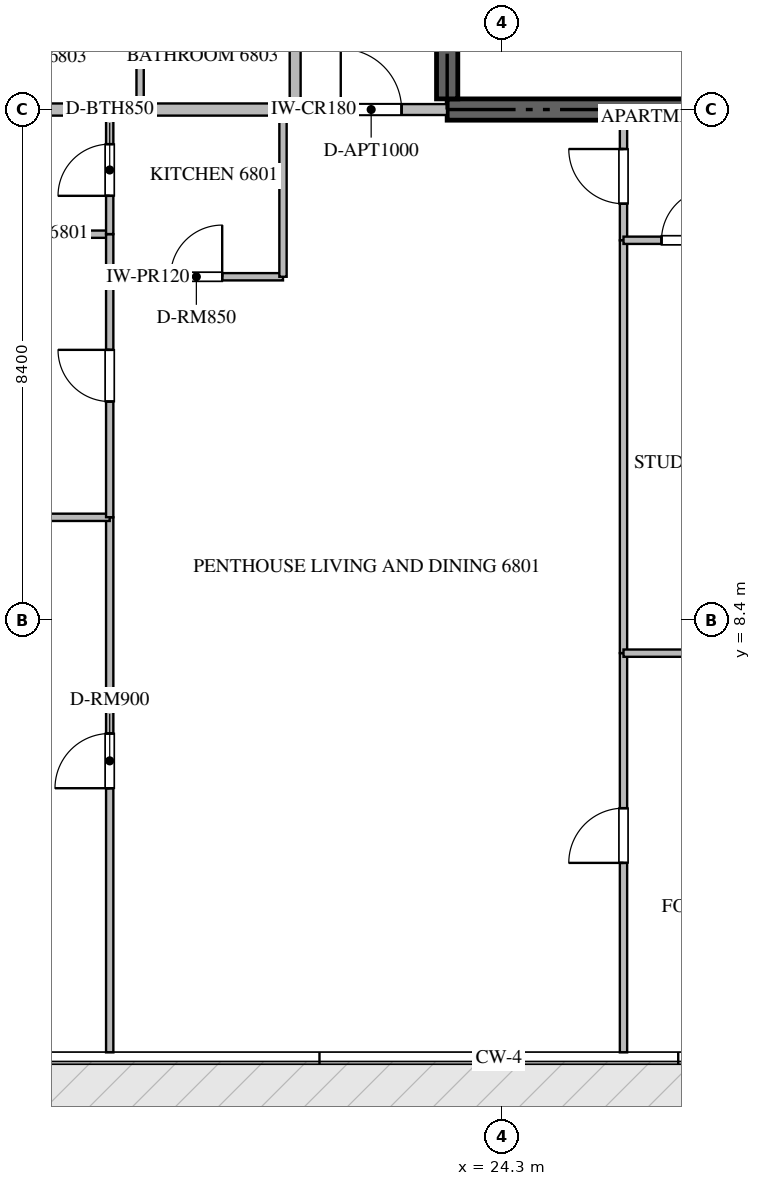
"""IFC4 building model, lengths in metres.
Left out: names, types, materials, properties, quantities, classifications, styles, units other than length and angle.
Written with IfcOpenShell. Run it as: python <this file> out.ifc"""

import sys

from ifc_helpers import new_model, si_unit, direction, frame, frame_2d, origin, place, context, subcontext, project, spatial, rectangle, extrude, source, transform, mapped, element, fill, save


model = new_model("IFC4")
c1 = context("Model", 3, precision=1e-05, world=origin(), true_north=direction((0.0, 1.0)))
c2 = subcontext(c1, "Body", "Model", "MODEL_VIEW")
j1 = project(units=[si_unit("LENGTHUNIT", "METRE"), si_unit("PLANEANGLEUNIT", "RADIAN")], contexts=[c1])
p1 = place(None, origin())
s1 = spatial("IfcSite", under=j1, at=p1, CompositionType="ELEMENT")
p2 = place(p1, origin())
s2 = spatial("IfcBuilding", under=s1, at=p2, CompositionType="ELEMENT")
p3 = place(p2, frame((0.0, 0.0, 272.05)))
s3 = spatial("IfcBuildingStorey", under=s2, at=p3, CompositionType="ELEMENT", Elevation=272.05)
p4 = place(p3, frame((23.4, 16.8, -0.26), z_axis=(0.0, 0.0, 1.0), x_axis=(1.0, 0.0, 0.0)))
e1 = element("IfcWall", 1, at=p4, inside=s3, PredefinedType="SHEAR", context=c2, shape_type="SweptSolid", body=[
    extrude(rectangle(XDim=18.0, YDim=0.35, at=frame_2d((9.0, 0.0))), origin(), (0.0, 0.0, 1.0), 3.848),
])
p5 = place(p3, frame((23.4, 16.975, -0.26), z_axis=(0.0, 0.0, 1.0), x_axis=(0.0, 1.0, 0.0)))
e2 = element("IfcWall", 2, at=p5, inside=s3, PredefinedType="SHEAR", context=c2, shape_type="SweptSolid", body=[
    extrude(rectangle(XDim=4.875, YDim=0.35, at=frame_2d((2.438, 0.0))), origin(), (0.0, 0.0, 1.0), 3.848),
])
p6 = place(p3, frame((7.482, 16.8, 0.0), z_axis=(0.0, 0.0, 1.0), x_axis=(1.0, 0.0, 0.0)))
e3 = element("IfcWall", 3, at=p6, inside=s3, PredefinedType="PARTITIONING", context=c2, shape_type="SweptSolid", body=[
    extrude(rectangle(XDim=13.418, YDim=0.2, at=frame_2d((6.709, 0.0))), origin(), (0.0, 0.0, 1.0), 3.59),
])
p7 = place(p3, frame((20.902, 16.8, 0.0), z_axis=(0.0, 0.0, 1.0), x_axis=(1.0, 0.0, 0.0)))
e4 = element("IfcWall", 4, at=p7, inside=s3, PredefinedType="PARTITIONING", context=c2, shape_type="SweptSolid", body=[
    extrude(rectangle(XDim=2.496, YDim=0.18, at=frame_2d((1.248, 0.0))), origin(), (0.0, 0.0, 1.0), 3.59),
])
p8 = place(p7, frame((0.748, 0.0, 0.0)))
e5 = element("IfcOpeningElement", 5, at=p8, cuts=e4, PredefinedType="OPENING", context=c2, shape_type="SweptSolid", body=[
    extrude(rectangle(XDim=1.0, YDim=2.15, at=frame_2d((0.5, 1.075))), frame((0.0, 0.1, 0.0), z_axis=(0.0, -1.0, 0.0), x_axis=(1.0, 0.0, 0.0)), (0.0, 0.0, 1.0), 0.2),
])
p9 = place(p3, frame((20.9, 16.8, 0.0), z_axis=(0.0, 0.0, 1.0), x_axis=(0.0, 1.0, 0.0)))
e6 = element("IfcWall", 6, at=p9, inside=s3, PredefinedType="PARTITIONING", context=c2, shape_type="SweptSolid", body=[
    extrude(rectangle(XDim=16.8, YDim=0.18, at=frame_2d((8.4, 0.0))), origin(), (0.0, 0.0, 1.0), 3.59),
])
p10 = place(p9, frame((3.018, 0.0, 0.0)))
e7 = element("IfcOpeningElement", 7, at=p10, cuts=e6, PredefinedType="OPENING", context=c2, shape_type="SweptSolid", body=[
    extrude(rectangle(XDim=1.0, YDim=2.15, at=frame_2d((0.5, 1.075))), frame((0.0, 0.1, 0.0), z_axis=(0.0, -1.0, 0.0), x_axis=(1.0, 0.0, 0.0)), (0.0, 0.0, 1.0), 0.2),
])
p11 = place(p9, frame((9.18, 0.0, 0.0)))
e8 = element("IfcOpeningElement", 8, at=p11, cuts=e6, PredefinedType="OPENING", context=c2, shape_type="SweptSolid", body=[
    extrude(rectangle(XDim=1.0, YDim=2.15, at=frame_2d((0.5, 1.075))), frame((0.0, 0.1, 0.0), z_axis=(0.0, -1.0, 0.0), x_axis=(1.0, 0.0, 0.0)), (0.0, 0.0, 1.0), 0.2),
])
p12 = place(p9, frame((14.5, 0.0, 0.0)))
e9 = element("IfcOpeningElement", 9, at=p12, cuts=e6, PredefinedType="OPENING", context=c2, shape_type="SweptSolid", body=[
    extrude(rectangle(XDim=1.0, YDim=2.15, at=frame_2d((0.5, 1.075))), frame((0.0, 0.1, 0.0), z_axis=(0.0, -1.0, 0.0), x_axis=(1.0, 0.0, 0.0)), (0.0, 0.0, 1.0), 0.2),
])
p13 = place(p3, frame((17.85, 14.05, 0.0), z_axis=(0.0, 0.0, 1.0), x_axis=(1.0, 0.0, 0.0)))
e10 = element("IfcWall", 10, at=p13, inside=s3, PredefinedType="PARTITIONING", context=c2, shape_type="SweptSolid", body=[
    extrude(rectangle(XDim=2.85, YDim=0.12, at=frame_2d((1.425, 0.0))), origin(), (0.0, 0.0, 1.0), 3.59),
])
p14 = place(p13, frame((1.0, 0.0, 0.0)))
e11 = element("IfcOpeningElement", 11, at=p14, cuts=e10, PredefinedType="OPENING", context=c2, shape_type="SweptSolid", body=[
    extrude(rectangle(XDim=0.85, YDim=2.1, at=frame_2d((0.425, 1.05))), frame((0.0, 0.07, 0.0), z_axis=(0.0, -1.0, 0.0), x_axis=(1.0, 0.0, 0.0)), (0.0, 0.0, 1.0), 0.14),
])
p15 = place(p3, frame((20.7, 14.05, 0.0), z_axis=(0.0, 0.0, 1.0), x_axis=(0.0, 1.0, 0.0)))
e12 = element("IfcWall", 12, at=p15, inside=s3, PredefinedType="PARTITIONING", context=c2, shape_type="SweptSolid", body=[
    extrude(rectangle(XDim=2.81, YDim=0.12, at=frame_2d((1.405, 0.0))), origin(), (0.0, 0.0, 1.0), 3.59),
])
p16 = place(p3, frame((17.85, 1.295, 0.0), z_axis=(0.0, 0.0, 1.0), x_axis=(0.0, 1.0, 0.0)))
e13 = element("IfcWall", 13, at=p16, inside=s3, PredefinedType="PARTITIONING", context=c2, shape_type="SweptSolid", body=[
    extrude(rectangle(XDim=8.799, YDim=0.12, at=frame_2d((4.399, 0.0))), origin(), (0.0, 0.0, 1.0), 3.59),
])
p17 = place(p16, frame((4.344, 0.0, 0.0)))
e14 = element("IfcOpeningElement", 14, at=p17, cuts=e13, PredefinedType="OPENING", context=c2, shape_type="SweptSolid", body=[
    extrude(rectangle(XDim=0.9, YDim=2.1, at=frame_2d((0.45, 1.05))), frame((0.0, 0.07, 0.0), z_axis=(0.0, -1.0, 0.0), x_axis=(1.0, 0.0, 0.0)), (0.0, 0.0, 1.0), 0.14),
])
p18 = place(p3, frame((7.495, 10.094, 0.0), z_axis=(0.0, 0.0, 1.0), x_axis=(1.0, 0.0, 0.0)))
e15 = element("IfcWall", 15, at=p18, inside=s3, PredefinedType="PARTITIONING", context=c2, shape_type="SweptSolid", body=[
    extrude(rectangle(XDim=10.355, YDim=0.12, at=frame_2d((5.177, 0.0))), origin(), (0.0, 0.0, 1.0), 3.122),
])
p19 = place(p3, frame((14.65, 14.75, 0.0), z_axis=(0.0, 0.0, 1.0), x_axis=(1.0, 0.0, 0.0)))
e16 = element("IfcWall", 16, at=p19, inside=s3, PredefinedType="PARTITIONING", context=c2, shape_type="SweptSolid", body=[
    extrude(rectangle(XDim=3.2, YDim=0.12, at=frame_2d((1.6, 0.0))), origin(), (0.0, 0.0, 1.0), 3.59),
])
p20 = place(p3, frame((17.85, 10.096, 0.0), z_axis=(0.0, 0.0, 1.0), x_axis=(0.0, 1.0, 0.0)))
e17 = element("IfcWall", 17, at=p20, inside=s3, PredefinedType="PARTITIONING", context=c2, shape_type="SweptSolid", body=[
    extrude(rectangle(XDim=4.654, YDim=0.12, at=frame_2d((2.327, 0.0))), origin(), (0.0, 0.0, 1.0), 3.59),
])
p21 = place(p20, frame((1.902, 0.0, 0.0)))
e18 = element("IfcOpeningElement", 18, at=p21, cuts=e17, PredefinedType="OPENING", context=c2, shape_type="SweptSolid", body=[
    extrude(rectangle(XDim=0.85, YDim=2.1, at=frame_2d((0.425, 1.05))), frame((0.0, 0.07, 0.0), z_axis=(0.0, -1.0, 0.0), x_axis=(1.0, 0.0, 0.0)), (0.0, 0.0, 1.0), 0.14),
])
p22 = place(p3, frame((17.85, 14.752, 0.0), z_axis=(0.0, 0.0, 1.0), x_axis=(0.0, 1.0, 0.0)))
e19 = element("IfcWall", 19, at=p22, inside=s3, PredefinedType="PARTITIONING", context=c2, shape_type="SweptSolid", body=[
    extrude(rectangle(XDim=2.108, YDim=0.12, at=frame_2d((1.054, 0.0))), origin(), (0.0, 0.0, 1.0), 3.59),
])
p23 = place(p22, frame((0.629, 0.0, 0.0)))
e20 = element("IfcOpeningElement", 20, at=p23, cuts=e19, PredefinedType="OPENING", context=c2, shape_type="SweptSolid", body=[
    extrude(rectangle(XDim=0.85, YDim=2.1, at=frame_2d((0.425, 1.05))), frame((0.0, 0.07, 0.0), z_axis=(0.0, -1.0, 0.0), x_axis=(1.0, 0.0, 0.0)), (0.0, 0.0, 1.0), 0.14),
])
p24 = place(p3, frame((26.3, 14.65, 0.0), z_axis=(0.0, 0.0, 1.0), x_axis=(0.0, 1.0, 0.0)))
e21 = element("IfcWall", 21, at=p24, inside=s3, PredefinedType="PARTITIONING", context=c2, shape_type="SweptSolid", body=[
    extrude(rectangle(XDim=1.975, YDim=0.12, at=frame_2d((0.988, 0.0))), origin(), (0.0, 0.0, 1.0), 3.59),
])
p25 = place(p24, frame((0.601, 0.0, 0.0)))
e22 = element("IfcOpeningElement", 22, at=p25, cuts=e21, PredefinedType="OPENING", context=c2, shape_type="SweptSolid", body=[
    extrude(rectangle(XDim=0.9, YDim=2.1, at=frame_2d((0.45, 1.05))), frame((0.0, 0.07, 0.0), z_axis=(0.0, -1.0, 0.0), x_axis=(1.0, 0.0, 0.0)), (0.0, 0.0, 1.0), 0.14),
])
p26 = place(p3, frame((26.3, 1.295, 0.0), z_axis=(0.0, 0.0, 1.0), x_axis=(0.0, 1.0, 0.0)))
e23 = element("IfcWall", 23, at=p26, inside=s3, PredefinedType="PARTITIONING", context=c2, shape_type="SweptSolid", body=[
    extrude(rectangle(XDim=6.565, YDim=0.12, at=frame_2d((3.283, 0.0))), origin(), (0.0, 0.0, 1.0), 3.59),
])
p27 = place(p26, frame((3.116, 0.0, 0.0)))
e24 = element("IfcOpeningElement", 24, at=p27, cuts=e23, PredefinedType="OPENING", context=c2, shape_type="SweptSolid", body=[
    extrude(rectangle(XDim=0.9, YDim=2.1, at=frame_2d((0.45, 1.05))), frame((0.0, 0.07, 0.0), z_axis=(0.0, -1.0, 0.0), x_axis=(1.0, 0.0, 0.0)), (0.0, 0.0, 1.0), 0.14),
])
p28 = place(p3, frame((26.3, 7.862, 0.0), z_axis=(0.0, 0.0, 1.0), x_axis=(0.0, 1.0, 0.0)))
e25 = element("IfcWall", 25, at=p28, inside=s3, PredefinedType="PARTITIONING", context=c2, shape_type="SweptSolid", body=[
    extrude(rectangle(XDim=6.786, YDim=0.12, at=frame_2d((3.393, 0.0))), origin(), (0.0, 0.0, 1.0), 3.59),
])
p29 = place(p3, frame((26.3, 7.86, 0.0), z_axis=(0.0, 0.0, 1.0), x_axis=(1.0, 0.0, 0.0)))
e26 = element("IfcWall", 26, at=p29, inside=s3, PredefinedType="PARTITIONING", context=c2, shape_type="SweptSolid", body=[
    extrude(rectangle(XDim=5.15, YDim=0.12, at=frame_2d((2.575, 0.0))), origin(), (0.0, 0.0, 1.0), 3.59),
])
p30 = place(p3, frame((26.3, 14.65, 0.0), z_axis=(0.0, 0.0, 1.0), x_axis=(1.0, 0.0, 0.0)))
e27 = element("IfcWall", 27, at=p30, inside=s3, PredefinedType="PARTITIONING", context=c2, shape_type="SweptSolid", body=[
    extrude(rectangle(XDim=2.1, YDim=0.12, at=frame_2d((1.05, 0.0))), origin(), (0.0, 0.0, 1.0), 3.59),
])
p31 = place(p30, frame((0.625, 0.0, 0.0)))
e28 = element("IfcOpeningElement", 28, at=p31, cuts=e27, PredefinedType="OPENING", context=c2, shape_type="SweptSolid", body=[
    extrude(rectangle(XDim=0.85, YDim=2.1, at=frame_2d((0.425, 1.05))), frame((0.0, 0.07, 0.0), z_axis=(0.0, -1.0, 0.0), x_axis=(1.0, 0.0, 0.0)), (0.0, 0.0, 1.0), 0.14),
])
p32 = place(p3, frame((18.35, 16.74, 0.0), z_axis=(0.0, 0.0, 1.0), x_axis=(0.0, 1.0, 0.0)))
e29 = element("IfcWall", 29, at=p32, inside=s3, PredefinedType="PARTITIONING", context=c2, shape_type="SweptSolid", body=[
    extrude(rectangle(XDim=2.31, YDim=0.12, at=frame_2d((1.155, 0.0))), origin(), (0.0, 0.0, 1.0), 3.59),
])
m1 = source(origin(), c2, "Body", "SweptSolid", [
    extrude(rectangle(XDim=1.0, YDim=2.15, at=frame_2d((0.5, 1.075))), frame((0.0, 0.025, 0.0), z_axis=(0.0, -1.0, 0.0), x_axis=(1.0, 0.0, 0.0)), (0.0, 0.0, 1.0), 0.05),
])
p33 = place(p8, origin())
e30 = element("IfcDoor", 30, at=p33, inside=s3, OperationType="SINGLE_SWING_LEFT", PredefinedType="DOOR", context=c2, shape_type="MappedRepresentation", body=[
    mapped(m1, transform((0.0, 0.0, 0.0), scale=1.0)),
])
fill(e5, e30)
m2 = source(origin(), c2, "Body", "SweptSolid", [
    extrude(rectangle(XDim=0.85, YDim=2.1, at=frame_2d((0.425, 1.05))), frame((0.0, 0.025, 0.0), z_axis=(0.0, -1.0, 0.0), x_axis=(1.0, 0.0, 0.0)), (0.0, 0.0, 1.0), 0.05),
])
p34 = place(p14, origin())
e31 = element("IfcDoor", 31, at=p34, inside=s3, OperationType="SINGLE_SWING_RIGHT", PredefinedType="DOOR", context=c2, shape_type="MappedRepresentation", body=[
    mapped(m2, transform((0.0, 0.0, 0.0), scale=1.0)),
])
fill(e11, e31)
m3 = source(origin(), c2, "Body", "SweptSolid", [
    extrude(rectangle(XDim=0.9, YDim=2.1, at=frame_2d((0.45, 1.05))), frame((0.0, 0.025, 0.0), z_axis=(0.0, -1.0, 0.0), x_axis=(1.0, 0.0, 0.0)), (0.0, 0.0, 1.0), 0.05),
])
p35 = place(p17, origin())
e32 = element("IfcDoor", 32, at=p35, inside=s3, OperationType="SINGLE_SWING_LEFT", PredefinedType="DOOR", context=c2, shape_type="MappedRepresentation", body=[
    mapped(m3, transform((0.0, 0.0, 0.0), scale=1.0)),
])
fill(e14, e32)
p36 = place(p21, origin())
e33 = element("IfcDoor", 33, at=p36, inside=s3, OperationType="SINGLE_SWING_RIGHT", PredefinedType="DOOR", context=c2, shape_type="MappedRepresentation", body=[
    mapped(m2, transform((0.0, 0.0, 0.0), scale=1.0)),
])
fill(e18, e33)
p37 = place(p23, origin())
e34 = element("IfcDoor", 34, at=p37, inside=s3, OperationType="SINGLE_SWING_LEFT", PredefinedType="DOOR", context=c2, shape_type="MappedRepresentation", body=[
    mapped(m2, transform((0.0, 0.0, 0.0), scale=1.0)),
])
fill(e20, e34)
p38 = place(p25, origin())
e35 = element("IfcDoor", 35, at=p38, inside=s3, OperationType="SINGLE_SWING_RIGHT", PredefinedType="DOOR", context=c2, shape_type="MappedRepresentation", body=[
    mapped(m3, transform((0.0, 0.0, 0.0), scale=1.0)),
])
fill(e22, e35)
p39 = place(p27, origin())
e36 = element("IfcDoor", 36, at=p39, inside=s3, OperationType="SINGLE_SWING_LEFT", PredefinedType="DOOR", context=c2, shape_type="MappedRepresentation", body=[
    mapped(m3, transform((0.0, 0.0, 0.0), scale=1.0)),
])
fill(e24, e36)
p40 = place(p31, origin())
e37 = element("IfcDoor", 37, at=p40, inside=s3, OperationType="SINGLE_SWING_RIGHT", PredefinedType="DOOR", context=c2, shape_type="MappedRepresentation", body=[
    mapped(m2, transform((0.0, 0.0, 0.0), scale=1.0)),
])
fill(e28, e37)
save(model, sys.argv[1])
